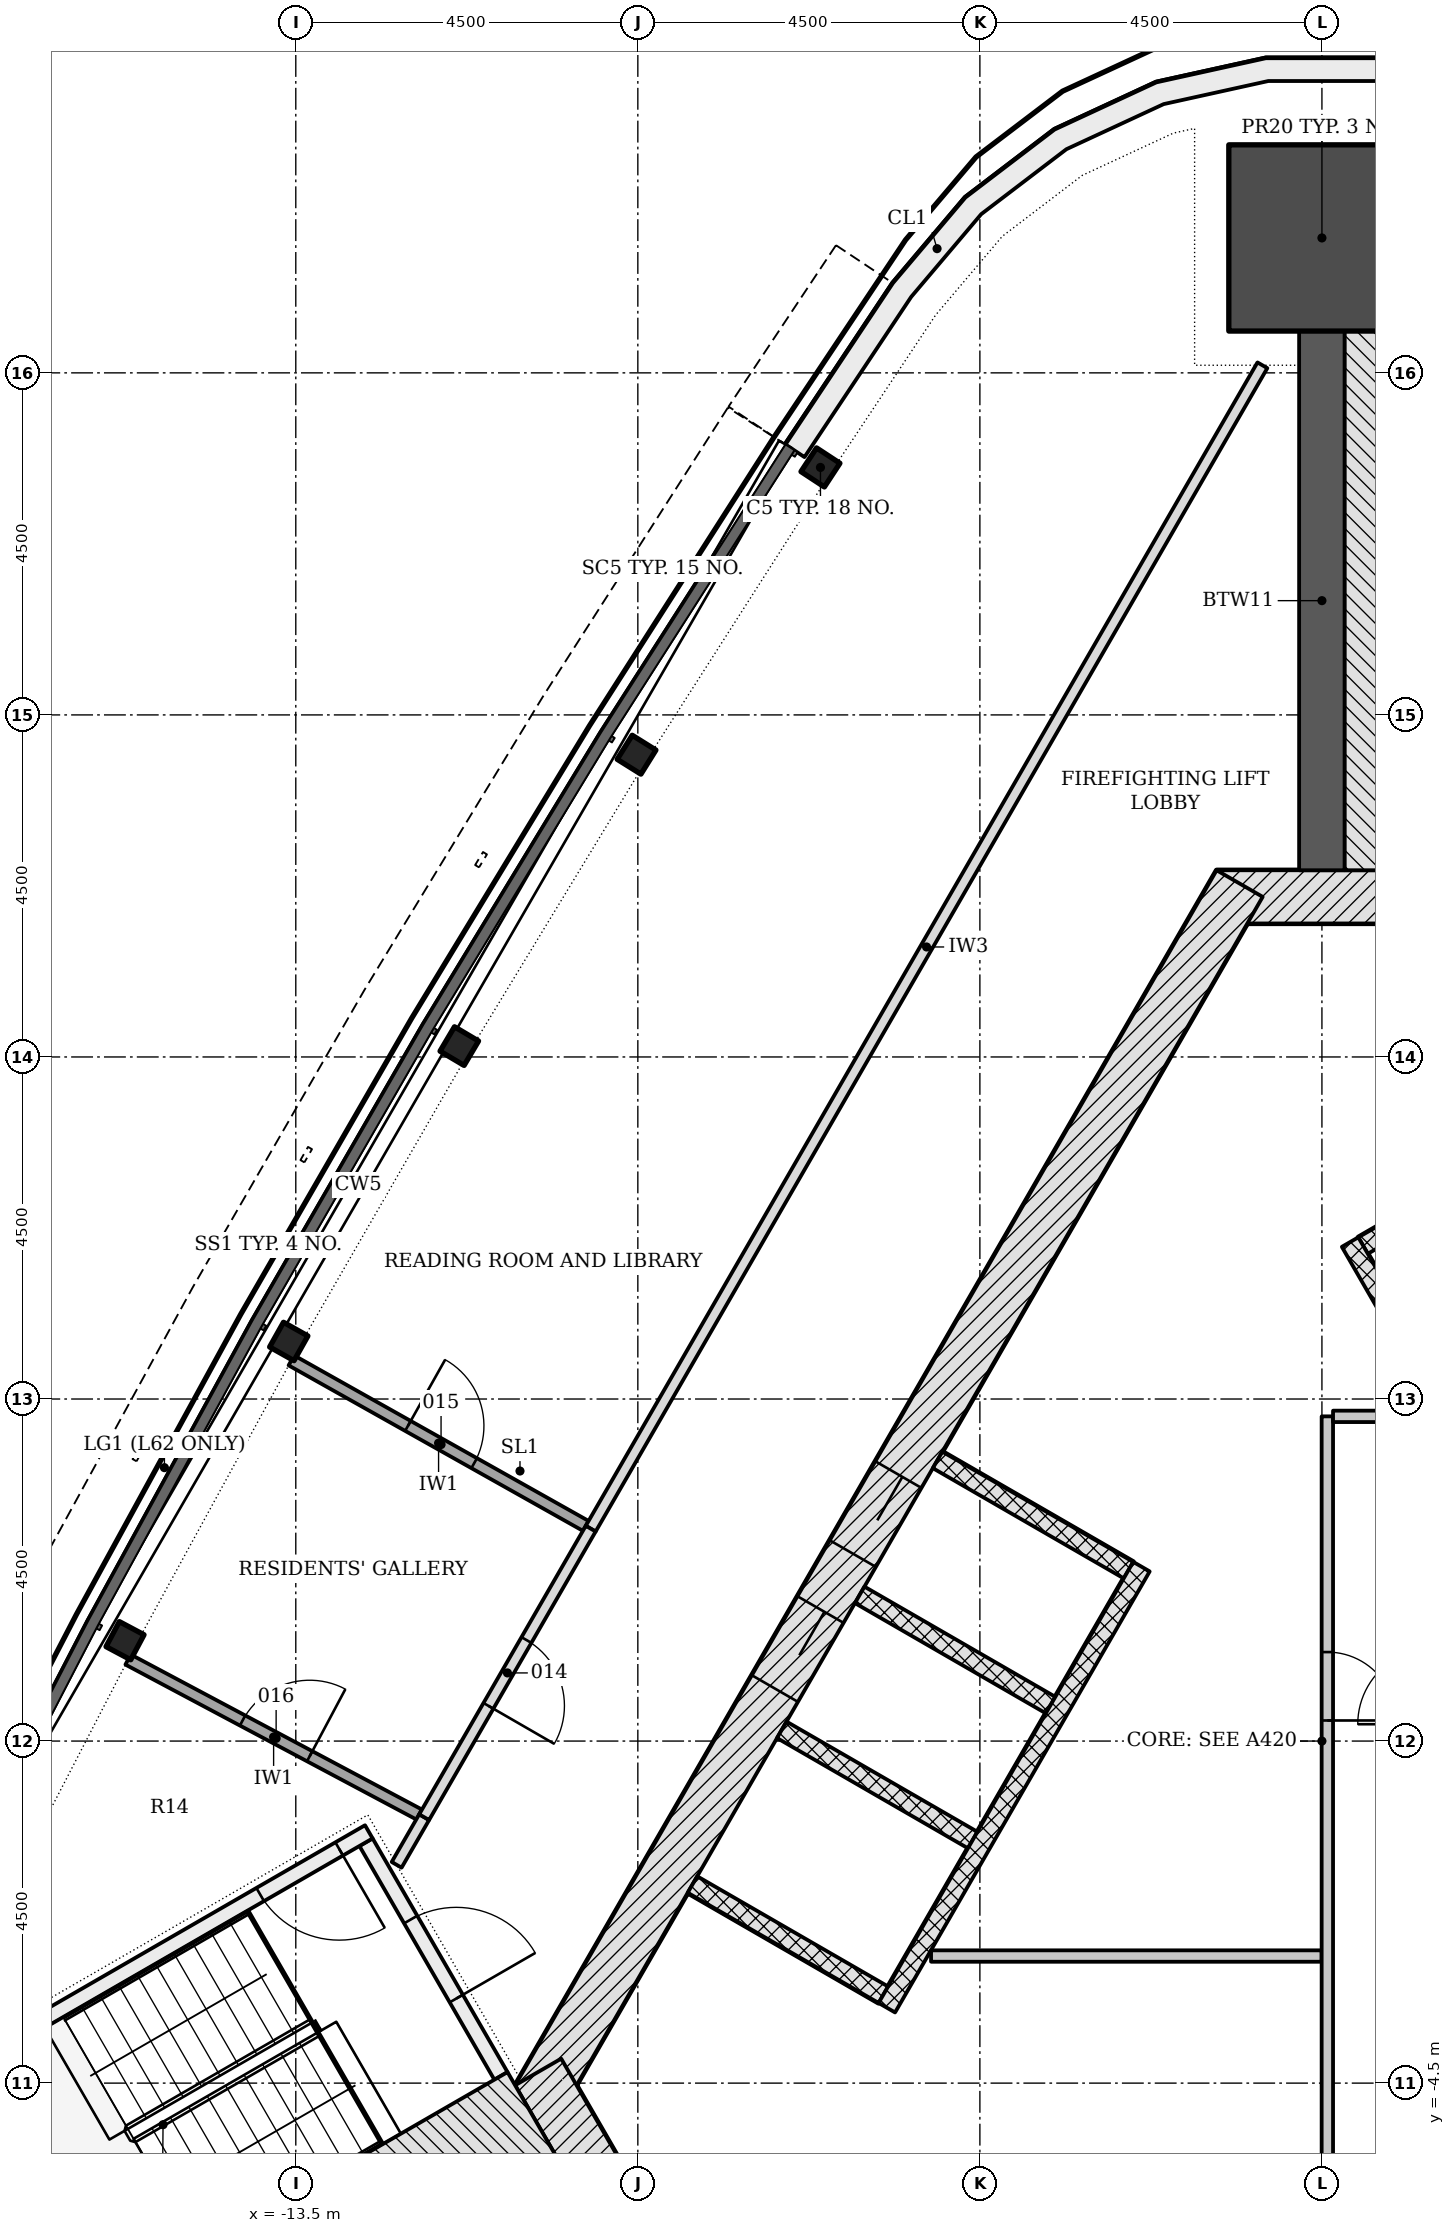
"""IFC4 building model, lengths in metres.
Left out: names, types, materials, properties, quantities, classifications, styles, units other than length and angle.
Written with IfcOpenShell. Run it as: python <this file> out.ifc"""

import sys

from ifc_helpers import new_model, si_unit, direction, frame, frame_2d, origin, origin_2d, place, context, subcontext, project, spatial, polyline, rectangle, i_section, outline, extrude, element, fill, save


model = new_model("IFC4")
c1 = context("Model", 3, precision=1e-05, world=origin(), true_north=direction((0.0, 1.0)))
c2 = subcontext(c1, "Body", "Model", "MODEL_VIEW")
j1 = project(units=[si_unit("LENGTHUNIT", "METRE"), si_unit("PLANEANGLEUNIT", "RADIAN")], contexts=[c1])
p1 = place(None, origin())
s1 = spatial("IfcSite", under=j1, at=p1, CompositionType="ELEMENT")
p2 = place(p1, origin())
s2 = spatial("IfcBuilding", under=s1, at=p2, CompositionType="ELEMENT")
p3 = place(p2, frame((0.0, 0.0, 240.0)))
s3 = spatial("IfcBuildingStorey", under=s2, at=p3, CompositionType="ELEMENT", Elevation=240.0)
p4 = place(p3, frame((1.386, 11.106, -0.2), z_axis=(0.0, 0.0, 1.0), x_axis=(-1.0, 0.0, 0.0)))
e1 = element("IfcWall", 1, at=p4, inside=s3, PredefinedType="SHEAR", context=c2, shape_type="SweptSolid", body=[
    extrude(rectangle(XDim=2.771, YDim=0.7, at=frame_2d((1.386, 0.0))), origin(), (0.0, 0.0, 1.0), 3.6),
])
p5 = place(p3, frame((-1.083, 11.281, -0.2), z_axis=(0.0, 0.0, 1.0), x_axis=(-0.500001446645, -0.866024568562, 0.0)))
e2 = element("IfcWall", 2, at=p5, inside=s3, PredefinedType="SHEAR", context=c2, shape_type="SweptSolid", body=[
    extrude(rectangle(XDim=18.458, YDim=0.7, at=frame_2d((9.229, 0.0))), origin(), (0.0, 0.0, 1.0), 3.6),
])
p6 = place(p5, frame((8.979, 0.0, 0.2)))
e3 = element("IfcOpeningElement", 3, at=p6, cuts=e2, PredefinedType="OPENING", context=c2, shape_type="SweptSolid", body=[
    extrude(rectangle(XDim=1.2, YDim=2.1, at=frame_2d((0.6, 1.05))), frame((0.0, 0.36, 0.0), z_axis=(0.0, -1.0, 0.0), x_axis=(1.0, 0.0, 0.0)), (0.0, 0.0, 1.0), 0.72),
])
p7 = place(p5, frame((11.029, 0.0, 0.2)))
e4 = element("IfcOpeningElement", 4, at=p7, cuts=e2, PredefinedType="OPENING", context=c2, shape_type="SweptSolid", body=[
    extrude(rectangle(XDim=1.2, YDim=2.1, at=frame_2d((0.6, 1.05))), frame((0.0, 0.36, 0.0), z_axis=(0.0, -1.0, 0.0), x_axis=(1.0, 0.0, 0.0)), (0.0, 0.0, 1.0), 0.72),
])
p8 = place(p3, frame((-10.311, -4.353, -0.2), z_axis=(0.0, 0.0, 1.0), x_axis=(0.500042739161, -0.866000726912, 0.0)))
e5 = element("IfcWall", 5, at=p8, inside=s3, PredefinedType="SHEAR", context=c2, shape_type="SweptSolid", body=[
    extrude(rectangle(XDim=2.771, YDim=0.7, at=frame_2d((1.386, 0.0))), origin(), (0.0, 0.0, 1.0), 3.6),
])
p9 = place(p3, frame((0.0, 11.456, -0.2), z_axis=(0.0, 0.0, 1.0), x_axis=(0.0, 1.0, 0.0)))
e6 = element("IfcWall", 6, at=p9, inside=s3, PredefinedType="SHEAR", context=c2, shape_type="SweptSolid", body=[
    extrude(rectangle(XDim=7.094, YDim=0.6, at=frame_2d((3.547, 0.0))), origin(), (0.0, 0.0, 1.0), 3.6),
])
p10 = place(p3, frame((0.0, 19.775, -0.2), z_axis=(0.0, 0.0, 1.0), x_axis=(0.0, 1.0, 0.0)))
e7 = element("IfcColumn", 7, at=p10, inside=s3, PredefinedType="COLUMN", context=c2, shape_type="SweptSolid", body=[
    extrude(rectangle(XDim=2.45, YDim=2.45, at=origin_2d()), origin(), (0.0, 0.0, 1.0), 3.6),
])
for number, where, z_axis, x_axis in (
    (8, (-6.597, 16.756, -0.2), (0.0, 0.0, 1.0), (-0.549, -0.836, 0.0)),
    (9, (-9.017, 12.977, -0.2), (0.0, 0.0, 1.0), (-0.529, -0.848, 0.0)),
    (10, (-11.349, 9.143, -0.2), (0.0, 0.0, 1.0), (-0.51, -0.86, 0.0)),
    (11, (-13.593, 5.257, -0.2), (0.0, 0.0, 1.0), (-0.49, -0.872, 0.0)),
    (12, (-15.747, 1.32, -0.2), (0.0, 0.0, 1.0), (-0.47, -0.883, 0.0)),
):
    element("IfcColumn", number, at=place(p3, frame(where, z_axis=z_axis, x_axis=x_axis)), inside=s3, PredefinedType="COLUMN", context=c2, shape_type="SweptSolid", body=[
        extrude(i_section(OverallWidth=0.373, OverallDepth=0.368, WebThickness=0.015, FlangeThickness=0.024, FilletRadius=0.015, at=origin_2d()), origin(), (0.0, 0.0, 1.0), 3.6),
    ])
p11 = place(p3, origin())
e13 = element("IfcWall", 13, at=p11, inside=s3, PredefinedType="NOTDEFINED", context=c2, shape_type="SweptSolid", body=[
    extrude(outline(polyline([(-18.301, -2.417), (-19.433, -4.702), (-19.931, -6.091), (-20.119, -7.555), (-19.987, -9.024), (-19.542, -10.431), (-18.804, -11.708), (-17.809, -12.798), (-16.602, -13.646), (-15.241, -14.215), (-13.789, -14.478), (-11.244, -14.641), (-11.225, -14.341), (-13.752, -14.18), (-15.155, -13.926), (-16.456, -13.382), (-17.609, -12.571), (-18.561, -11.53), (-19.266, -10.309), (-19.691, -8.965), (-19.817, -7.56), (-19.638, -6.162), (-19.156, -4.82), (-18.032, -2.55), (-18.301, -2.417)])), origin(), (0.0, 0.0, 1.0), 3.3),
])
p12 = place(p3, origin())
e14 = element("IfcWall", 14, at=p12, inside=s3, PredefinedType="NOTDEFINED", context=c2, shape_type="SweptSolid", body=[
    extrude(outline(polyline([(7.057, 17.058), (5.644, 19.18), (4.691, 20.307), (3.517, 21.201), (2.178, 21.822), (0.738, 22.139), (-0.738, 22.139), (-2.178, 21.822), (-3.517, 21.201), (-4.691, 20.307), (-5.644, 19.18), (-7.057, 17.058), (-6.807, 16.891), (-5.404, 19.0), (-4.483, 20.088), (-3.361, 20.943), (-2.082, 21.536), (-0.705, 21.839), (0.705, 21.839), (2.082, 21.536), (3.361, 20.943), (4.483, 20.088), (5.404, 19.0), (6.807, 16.891), (7.057, 17.058)])), origin(), (0.0, 0.0, 1.0), 3.3),
])
p13 = place(p3, frame((2.706, 7.769, -0.2), z_axis=(0.0, 0.0, 1.0), x_axis=(-0.866022959057, -0.500004234368, 0.0)))
e15 = element("IfcWall", 15, at=p13, inside=s3, PredefinedType="PARTITIONING", context=c2, shape_type="SweptSolid", body=[
    extrude(rectangle(XDim=2.5, YDim=0.25, at=frame_2d((1.25, 0.0))), origin(), (0.0, 0.0, 1.0), 3.6),
])
p14 = place(p3, frame((5.87, -2.961, 0.0), z_axis=(0.0, 0.0, 1.0), x_axis=(-0.50000615651, 0.866021849293, 0.0)))
e16 = element("IfcWall", 16, at=p14, inside=s3, PredefinedType="PARTITIONING", context=c2, shape_type="SweptSolid", body=[
    extrude(rectangle(XDim=11.0, YDim=0.25, at=frame_2d((5.5, 0.0))), origin(), (0.0, 0.0, 1.0), 3.4),
])
for number, where, z_axis, x_axis in (
    (17, (-5.056, 3.699, -0.2), (0.0, 0.0, 1.0), (0.866, -0.5, 0.0)),
    (18, (-6.081, 1.923, -0.2), (0.0, 0.0, 1.0), (0.866, -0.5, 0.0)),
    (19, (-7.106, 0.148, -0.2), (0.0, 0.0, 1.0), (0.866, -0.5, 0.0)),
    (20, (-8.281, -1.887, -0.2), (0.0, 0.0, 1.0), (0.866, -0.5, 0.0)),
):
    element("IfcWall", number, at=place(p3, frame(where, z_axis=z_axis, x_axis=x_axis)), inside=s3, PredefinedType="PARTITIONING", context=c2, shape_type="SweptSolid", body=[
        extrude(rectangle(XDim=2.9, YDim=0.25, at=frame_2d((1.45, 0.0))), origin(), (0.0, 0.0, 1.0), 3.6),
    ])
p15 = place(p3, frame((-2.374, 2.294, 0.0), z_axis=(0.0, 0.0, 1.0), x_axis=(-0.500003174267, -0.866023571113, 0.0)))
e21 = element("IfcWall", 21, at=p15, inside=s3, PredefinedType="PARTITIONING", context=c2, shape_type="SweptSolid", body=[
    extrude(rectangle(XDim=6.7, YDim=0.25, at=frame_2d((3.35, 0.0))), origin(), (0.0, 0.0, 1.0), 3.4),
])
p16 = place(p3, frame((-5.142, -2.828, 0.0), z_axis=(0.0, 0.0, 1.0), x_axis=(1.0, 0.0, 0.0)))
e22 = element("IfcWall", 22, at=p16, inside=s3, PredefinedType="PARTITIONING", context=c2, shape_type="SweptSolid", body=[
    extrude(rectangle(XDim=5.139, YDim=0.15, at=frame_2d((2.569, 0.0))), origin(), (0.0, 0.0, 1.0), 3.4),
])
p17 = place(p3, frame((0.071, 4.272, 0.0), z_axis=(0.0, 0.0, 1.0), x_axis=(0.0, -1.0, 0.0)))
e23 = element("IfcWall", 23, at=p17, inside=s3, PredefinedType="PARTITIONING", context=c2, shape_type="SweptSolid", body=[
    extrude(rectangle(XDim=10.5, YDim=0.15, at=frame_2d((5.25, 0.0))), origin(), (0.0, 0.0, 1.0), 3.4),
])
p18 = place(p17, frame((3.101, 0.0, 0.0)))
e24 = element("IfcOpeningElement", 24, at=p18, cuts=e23, PredefinedType="OPENING", context=c2, shape_type="SweptSolid", body=[
    extrude(rectangle(XDim=0.9, YDim=2.1, at=frame_2d((0.45, 1.05))), frame((0.0, 0.085, 0.0), z_axis=(0.0, -1.0, 0.0), x_axis=(1.0, 0.0, 0.0)), (0.0, 0.0, 1.0), 0.17),
])
p19 = place(p3, frame((0.146, 4.272, 0.0), z_axis=(0.0, 0.0, 1.0), x_axis=(1.0, 0.0, 0.0)))
e25 = element("IfcWall", 25, at=p19, inside=s3, PredefinedType="PARTITIONING", context=c2, shape_type="SweptSolid", body=[
    extrude(rectangle(XDim=1.25, YDim=0.15, at=frame_2d((0.625, 0.0))), origin(), (0.0, 0.0, 1.0), 3.4),
])
p20 = place(p3, frame((0.943, 11.456, -0.2), z_axis=(0.0, 0.0, 1.0), x_axis=(0.0, 1.0, 0.0)))
e26 = element("IfcWall", 26, at=p20, inside=s3, PredefinedType="SHEAR", context=c2, shape_type="SweptSolid", body=[
    extrude(rectangle(XDim=7.094, YDim=1.286, at=frame_2d((3.547, 0.0))), origin(), (0.0, 0.0, 1.0), 3.6),
])
p21 = place(p3, frame((-12.576, -1.331, -0.2), z_axis=(0.0, 0.0, 1.0), x_axis=(0.499970499736, -0.8660424351, 0.0)))
e27 = element("IfcWall", 27, at=p21, inside=s3, PredefinedType="SHEAR", context=c2, shape_type="SweptSolid", body=[
    extrude(rectangle(XDim=3.55, YDim=0.2, at=frame_2d((1.775, 0.0))), origin(), (0.0, 0.0, 1.0), 3.6),
])
p22 = place(p21, frame((1.175, 0.0, 0.2)))
e28 = element("IfcOpeningElement", 28, at=p22, cuts=e27, PredefinedType="OPENING", context=c2, shape_type="SweptSolid", body=[
    extrude(rectangle(XDim=1.2, YDim=2.1, at=frame_2d((0.6, 1.05))), frame((0.0, 0.11, 0.0), z_axis=(0.0, -1.0, 0.0), x_axis=(1.0, 0.0, 0.0)), (0.0, 0.0, 1.0), 0.22),
])
p23 = place(p3, frame((-12.539, -1.194, -0.2), z_axis=(0.0, 0.0, 1.0), x_axis=(-0.866045472092, -0.499965239061, 0.0)))
e29 = element("IfcWall", 29, at=p23, inside=s3, PredefinedType="SHEAR", context=c2, shape_type="SweptSolid", body=[
    extrude(rectangle(XDim=5.6, YDim=0.2, at=frame_2d((2.8, 0.0))), origin(), (0.0, 0.0, 1.0), 3.6),
])
p24 = place(p23, frame((0.45, 0.0, 0.2)))
e30 = element("IfcOpeningElement", 30, at=p24, cuts=e29, PredefinedType="OPENING", context=c2, shape_type="SweptSolid", body=[
    extrude(rectangle(XDim=1.2, YDim=2.1, at=frame_2d((0.6, 1.05))), frame((0.0, 0.11, 0.0), z_axis=(0.0, -1.0, 0.0), x_axis=(1.0, 0.0, 0.0)), (0.0, 0.0, 1.0), 0.22),
])
p25 = place(p3, frame((-10.393, -4.912, -0.2), z_axis=(0.0, 0.0, 1.0), x_axis=(-0.866023389271, -0.500003489223, 0.0)))
e31 = element("IfcWall", 31, at=p25, inside=s3, PredefinedType="SHEAR", context=c2, shape_type="SweptSolid", body=[
    extrude(rectangle(XDim=7.094, YDim=1.286, at=frame_2d((3.547, 0.0))), origin(), (0.0, 0.0, 1.0), 3.6),
])
p26 = place(p3, frame((-0.783, 18.1, 0.0), z_axis=(0.0, 0.0, 1.0), x_axis=(-0.499991500055, -0.866030311174, 0.0)))
e32 = element("IfcWall", 32, at=p26, inside=s3, PredefinedType="PARTITIONING", context=c2, shape_type="SweptSolid", body=[
    extrude(rectangle(XDim=17.674, YDim=0.15, at=frame_2d((8.837, 0.0))), origin(), (0.0, 0.0, 1.0), 2.852),
])
p27 = place(p3, frame((-11.811, -1.001, 0.0), z_axis=(0.0, 0.0, 1.0), x_axis=(-0.499839240638, -0.866118198353, 0.0)))
e33 = element("IfcWall", 33, at=p27, inside=s3, PredefinedType="PARTITIONING", context=c2, shape_type="SweptSolid", body=[
    extrude(rectangle(XDim=0.724, YDim=0.15, at=frame_2d((0.362, 0.0))), origin(), (0.0, 0.0, 1.0), 3.4),
])
p28 = place(p3, frame((-13.558, 5.008, 0.0), z_axis=(0.0, 0.0, 1.0), x_axis=(0.871701726161, -0.490036835971, 0.0)))
e34 = element("IfcWall", 34, at=p28, inside=s3, PredefinedType="PARTITIONING", context=c2, shape_type="SweptSolid", body=[
    extrude(rectangle(XDim=4.443, YDim=0.15, at=frame_2d((2.221, 0.0))), origin(), (0.0, 0.0, 1.0), 3.4),
])
p29 = place(p28, frame((1.759, 0.0, 0.0)))
e35 = element("IfcOpeningElement", 35, at=p29, cuts=e34, PredefinedType="OPENING", context=c2, shape_type="SweptSolid", body=[
    extrude(rectangle(XDim=1.0, YDim=2.1, at=frame_2d((0.5, 1.05))), frame((0.0, 0.085, 0.0), z_axis=(0.0, -1.0, 0.0), x_axis=(1.0, 0.0, 0.0)), (0.0, 0.0, 1.0), 0.17),
])
p30 = place(p3, frame((-15.706, 1.072, 0.0), z_axis=(0.0, 0.0, 1.0), x_axis=(0.882697050639, -0.469942461152, 0.0)))
e36 = element("IfcWall", 36, at=p30, inside=s3, PredefinedType="PARTITIONING", context=c2, shape_type="SweptSolid", body=[
    extrude(rectangle(XDim=4.337, YDim=0.15, at=frame_2d((2.169, 0.0))), origin(), (0.0, 0.0, 1.0), 3.4),
])
p31 = place(p30, frame((1.706, 0.0, 0.0)))
e37 = element("IfcOpeningElement", 37, at=p31, cuts=e36, PredefinedType="OPENING", context=c2, shape_type="SweptSolid", body=[
    extrude(rectangle(XDim=1.0, YDim=2.1, at=frame_2d((0.5, 1.05))), frame((0.0, 0.085, 0.0), z_axis=(0.0, -1.0, 0.0), x_axis=(1.0, 0.0, 0.0)), (0.0, 0.0, 1.0), 0.17),
])
p32 = place(p3, frame((-9.62, 2.794, 0.0), z_axis=(0.0, 0.0, 1.0), x_axis=(-0.500021421018, -0.866013036001, 0.0)))
e38 = element("IfcWall", 38, at=p32, inside=s3, PredefinedType="PARTITIONING", context=c2, shape_type="SweptSolid", body=[
    extrude(rectangle(XDim=4.383, YDim=0.15, at=frame_2d((2.191, 0.0))), origin(), (0.0, 0.0, 1.0), 2.852),
])
p33 = place(p32, frame((1.691, 0.0, 0.0)))
e39 = element("IfcOpeningElement", 39, at=p33, cuts=e38, PredefinedType="OPENING", context=c2, shape_type="SweptSolid", body=[
    extrude(rectangle(XDim=1.0, YDim=2.1, at=frame_2d((0.5, 1.05))), frame((0.0, 0.085, 0.0), z_axis=(0.0, -1.0, 0.0), x_axis=(1.0, 0.0, 0.0)), (0.0, 0.0, 1.0), 0.17),
])
p34 = place(p6, origin())
e40 = element("IfcDoor", 40, at=p34, inside=s3, OperationType="DOUBLE_DOOR_SLIDING", PredefinedType="DOOR", context=c2, shape_type="SweptSolid", body=[
    extrude(rectangle(XDim=1.2, YDim=2.1, at=frame_2d((0.6, 1.05))), frame((0.0, 0.025, 0.0), z_axis=(0.0, -1.0, 0.0), x_axis=(1.0, 0.0, 0.0)), (0.0, 0.0, 1.0), 0.05),
])
fill(e3, e40)
p35 = place(p7, origin())
e41 = element("IfcDoor", 41, at=p35, inside=s3, OperationType="DOUBLE_DOOR_SLIDING", PredefinedType="DOOR", context=c2, shape_type="SweptSolid", body=[
    extrude(rectangle(XDim=1.2, YDim=2.1, at=frame_2d((0.6, 1.05))), frame((0.0, 0.025, 0.0), z_axis=(0.0, -1.0, 0.0), x_axis=(1.0, 0.0, 0.0)), (0.0, 0.0, 1.0), 0.05),
])
fill(e4, e41)
p36 = place(p18, origin())
e42 = element("IfcDoor", 42, at=p36, inside=s3, OperationType="SINGLE_SWING_RIGHT", PredefinedType="DOOR", context=c2, shape_type="SweptSolid", body=[
    extrude(rectangle(XDim=0.9, YDim=2.1, at=frame_2d((0.45, 1.05))), frame((0.0, 0.025, 0.0), z_axis=(0.0, -1.0, 0.0), x_axis=(1.0, 0.0, 0.0)), (0.0, 0.0, 1.0), 0.05),
])
fill(e24, e42)
p37 = place(p22, origin())
e43 = element("IfcDoor", 43, at=p37, inside=s3, OperationType="SINGLE_SWING_RIGHT", PredefinedType="DOOR", context=c2, shape_type="SweptSolid", body=[
    extrude(rectangle(XDim=1.2, YDim=2.1, at=frame_2d((0.6, 1.05))), frame((0.0, 0.025, 0.0), z_axis=(0.0, -1.0, 0.0), x_axis=(1.0, 0.0, 0.0)), (0.0, 0.0, 1.0), 0.05),
])
fill(e28, e43)
p38 = place(p24, origin())
e44 = element("IfcDoor", 44, at=p38, inside=s3, OperationType="SINGLE_SWING_LEFT", PredefinedType="DOOR", context=c2, shape_type="SweptSolid", body=[
    extrude(rectangle(XDim=1.2, YDim=2.1, at=frame_2d((0.6, 1.05))), frame((0.0, 0.025, 0.0), z_axis=(0.0, -1.0, 0.0), x_axis=(1.0, 0.0, 0.0)), (0.0, 0.0, 1.0), 0.05),
])
fill(e30, e44)
p39 = place(p33, origin())
e45 = element("IfcDoor", 45, at=p39, inside=s3, OperationType="SINGLE_SWING_RIGHT", PredefinedType="DOOR", context=c2, shape_type="SweptSolid", body=[
    extrude(rectangle(XDim=1.0, YDim=2.1, at=frame_2d((0.5, 1.05))), frame((0.0, 0.025, 0.0), z_axis=(0.0, -1.0, 0.0), x_axis=(1.0, 0.0, 0.0)), (0.0, 0.0, 1.0), 0.05),
])
fill(e39, e45)
p40 = place(p29, origin())
e46 = element("IfcDoor", 46, at=p40, inside=s3, OperationType="SINGLE_SWING_LEFT", PredefinedType="DOOR", context=c2, shape_type="SweptSolid", body=[
    extrude(rectangle(XDim=1.0, YDim=2.1, at=frame_2d((0.5, 1.05))), frame((0.0, 0.025, 0.0), z_axis=(0.0, -1.0, 0.0), x_axis=(1.0, 0.0, 0.0)), (0.0, 0.0, 1.0), 0.05),
])
fill(e35, e46)
p41 = place(p31, origin())
e47 = element("IfcDoor", 47, at=p41, inside=s3, OperationType="SINGLE_SWING_RIGHT", PredefinedType="DOOR", context=c2, shape_type="SweptSolid", body=[
    extrude(rectangle(XDim=1.0, YDim=2.1, at=frame_2d((0.5, 1.05))), frame((0.0, 0.025, 0.0), z_axis=(0.0, -1.0, 0.0), x_axis=(1.0, 0.0, 0.0)), (0.0, 0.0, 1.0), 0.05),
])
fill(e37, e47)
save(model, sys.argv[1])
